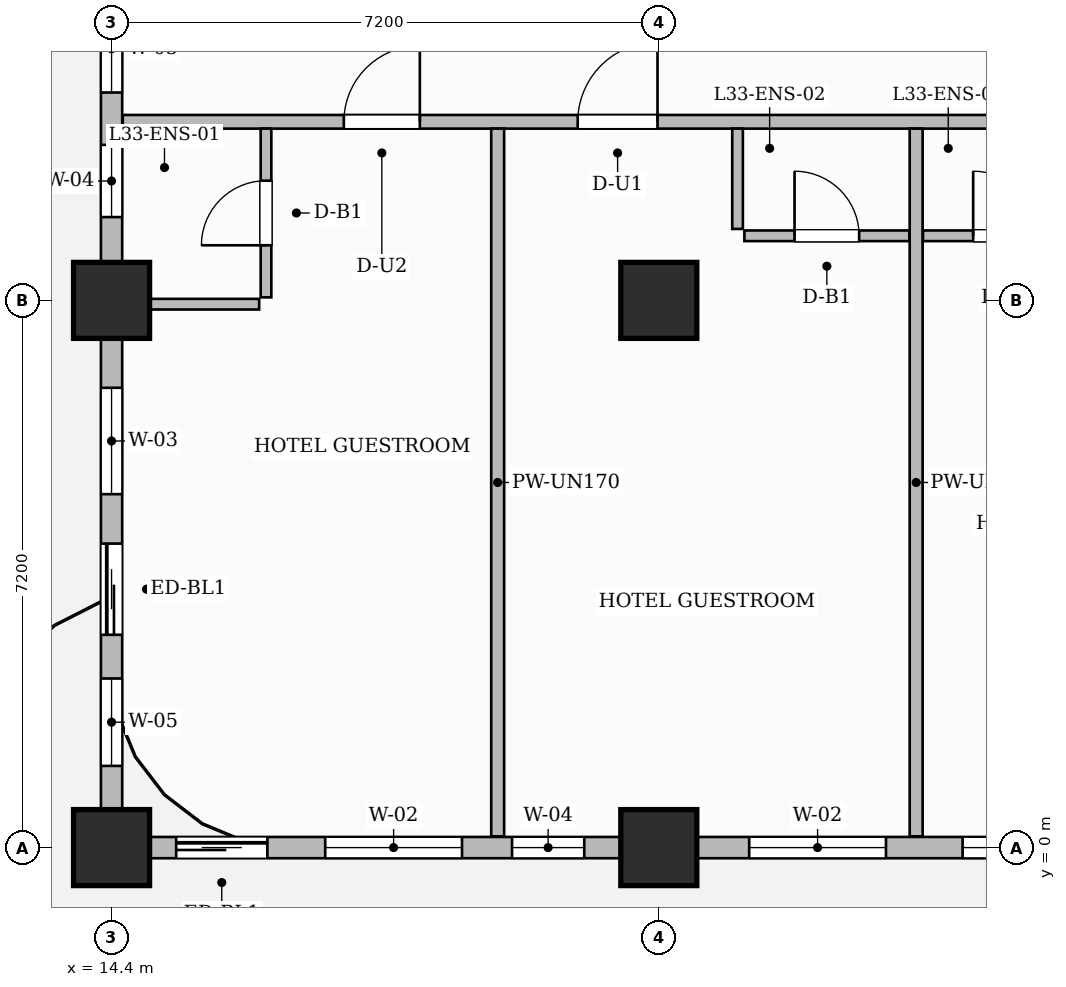
"""IFC4 building model, lengths in metres.
Left out: names, types, materials, properties, quantities, classifications, styles, units other than length and angle.
Written with IfcOpenShell. Run it as: python <this file> out.ifc"""

import sys

from ifc_helpers import new_model, si_unit, direction, frame, frame_2d, origin, origin_2d, place, context, subcontext, project, spatial, rectangle, extrude, source, transform, mapped, element, fill, save


model = new_model("IFC4")
c1 = context("Model", 3, precision=1e-05, world=origin(), true_north=direction((0.0, 1.0)))
c2 = subcontext(c1, "Body", "Model", "MODEL_VIEW")
j1 = project(units=[si_unit("LENGTHUNIT", "METRE"), si_unit("PLANEANGLEUNIT", "RADIAN")], contexts=[c1])
p1 = place(None, origin())
s1 = spatial("IfcSite", under=j1, at=p1, CompositionType="ELEMENT")
p2 = place(p1, origin())
s2 = spatial("IfcBuilding", under=s1, at=p2, CompositionType="ELEMENT")
p3 = place(p2, frame((0.0, 0.0, 134.0)))
s3 = spatial("IfcBuildingStorey", under=s2, at=p3, CompositionType="ELEMENT", Elevation=134.0)
m1 = source(origin(), c2, "Body", "SweptSolid", [
    extrude(rectangle(XDim=1.0, YDim=1.0, at=origin_2d()), origin(), (0.0, 0.0, 1.0), 3.7),
])
for number, where, z_axis, x_axis in (
    (1, (14.4, 0.0, 0.0), (0.0, 0.0, 1.0), (1.0, 0.0, 0.0)),
    (2, (14.4, 7.2, 0.0), (0.0, 0.0, 1.0), (1.0, 0.0, 0.0)),
    (3, (21.6, 0.0, 0.0), (0.0, 0.0, 1.0), (1.0, 0.0, 0.0)),
    (4, (21.6, 7.2, 0.0), (0.0, 0.0, 1.0), (1.0, 0.0, 0.0)),
):
    element("IfcColumn", number, at=place(p3, frame(where, z_axis=z_axis, x_axis=x_axis)), inside=s3, PredefinedType="COLUMN", context=c2, shape_type="MappedRepresentation", body=[
        mapped(m1, transform((0.0, 0.0, 0.0), scale=1.0)),
    ])
p4 = place(p3, frame((14.548, 9.55, 0.0), z_axis=(0.0, 0.0, 1.0), x_axis=(1.0, 0.0, 0.0)))
e5 = element("IfcWall", 5, at=p4, inside=s3, PredefinedType="PARTITIONING", context=c2, shape_type="SweptSolid", body=[
    extrude(rectangle(XDim=15.562, YDim=0.18, at=frame_2d((7.781, 0.0))), origin(), (0.0, 0.0, 1.0), 3.45),
])
p5 = place(p4, frame((2.908, 0.0, 0.0)))
e6 = element("IfcOpeningElement", 6, at=p5, cuts=e5, PredefinedType="OPENING", context=c2, shape_type="SweptSolid", body=[
    extrude(rectangle(XDim=1.0, YDim=2.2, at=frame_2d((0.5, 1.1))), frame((0.0, 0.1, 0.0), z_axis=(0.0, -1.0, 0.0), x_axis=(1.0, 0.0, 0.0)), (0.0, 0.0, 1.0), 0.2),
])
p6 = place(p4, frame((5.985, 0.0, 0.0)))
e7 = element("IfcOpeningElement", 7, at=p6, cuts=e5, PredefinedType="OPENING", context=c2, shape_type="SweptSolid", body=[
    extrude(rectangle(XDim=1.05, YDim=2.25, at=frame_2d((0.525, 1.125))), frame((0.0, 0.1, 0.0), z_axis=(0.0, -1.0, 0.0), x_axis=(1.0, 0.0, 0.0)), (0.0, 0.0, 1.0), 0.2),
])
p7 = place(p4, frame((13.72, 0.0, 0.0)))
e8 = element("IfcOpeningElement", 8, at=p7, cuts=e5, PredefinedType="OPENING", context=c2, shape_type="SweptSolid", body=[
    extrude(rectangle(XDim=1.0, YDim=2.2, at=frame_2d((0.5, 1.1))), frame((0.0, 0.1, 0.0), z_axis=(0.0, -1.0, 0.0), x_axis=(1.0, 0.0, 0.0)), (0.0, 0.0, 1.0), 0.2),
])
p8 = place(p3, frame((19.48, 0.148, 0.0), z_axis=(0.0, 0.0, 1.0), x_axis=(0.0, 1.0, 0.0)))
e9 = element("IfcWall", 9, at=p8, inside=s3, PredefinedType="PARTITIONING", context=c2, shape_type="SweptSolid", body=[
    extrude(rectangle(XDim=9.312, YDim=0.17, at=frame_2d((4.656, 0.0))), origin(), (0.0, 0.0, 1.0), 3.45),
])
p9 = place(p3, frame((24.986, 0.148, 0.0), z_axis=(0.0, 0.0, 1.0), x_axis=(0.0, 1.0, 0.0)))
e10 = element("IfcWall", 10, at=p9, inside=s3, PredefinedType="PARTITIONING", context=c2, shape_type="SweptSolid", body=[
    extrude(rectangle(XDim=9.312, YDim=0.17, at=frame_2d((4.656, 0.0))), origin(), (0.0, 0.0, 1.0), 3.105),
])
p10 = place(p3, frame((16.432, 7.24, 0.0), z_axis=(0.0, 0.0, 1.0), x_axis=(0.0, 1.0, 0.0)))
e11 = element("IfcWall", 11, at=p10, inside=s3, PredefinedType="PARTITIONING", context=c2, shape_type="SweptSolid", body=[
    extrude(rectangle(XDim=2.22, YDim=0.14, at=frame_2d((1.11, 0.0))), origin(), (0.0, 0.0, 1.0), 3.45),
])
p11 = place(p10, frame((0.685, 0.0, 0.0)))
e12 = element("IfcOpeningElement", 12, at=p11, cuts=e11, PredefinedType="OPENING", context=c2, shape_type="SweptSolid", body=[
    extrude(rectangle(XDim=0.85, YDim=2.1, at=frame_2d((0.425, 1.05))), frame((0.0, 0.08, 0.0), z_axis=(0.0, -1.0, 0.0), x_axis=(1.0, 0.0, 0.0)), (0.0, 0.0, 1.0), 0.16),
])
p12 = place(p3, frame((14.49, 7.15, 0.0), z_axis=(0.0, 0.0, 1.0), x_axis=(1.0, 0.0, 0.0)))
e13 = element("IfcWall", 13, at=p12, inside=s3, PredefinedType="PARTITIONING", context=c2, shape_type="SweptSolid", body=[
    extrude(rectangle(XDim=1.852, YDim=0.14, at=frame_2d((0.926, 0.0))), origin(), (0.0, 0.0, 1.0), 2.935),
])
p13 = place(p3, frame((22.636, 8.14, 0.0), z_axis=(0.0, 0.0, 1.0), x_axis=(0.0, 1.0, 0.0)))
e14 = element("IfcWall", 14, at=p13, inside=s3, PredefinedType="PARTITIONING", context=c2, shape_type="SweptSolid", body=[
    extrude(rectangle(XDim=1.32, YDim=0.14, at=frame_2d((0.66, 0.0))), origin(), (0.0, 0.0, 1.0), 3.45),
])
p14 = place(p3, frame((22.726, 8.05, 0.0), z_axis=(0.0, 0.0, 1.0), x_axis=(1.0, 0.0, 0.0)))
e15 = element("IfcWall", 15, at=p14, inside=s3, PredefinedType="PARTITIONING", context=c2, shape_type="SweptSolid", body=[
    extrude(rectangle(XDim=2.17, YDim=0.14, at=frame_2d((1.085, 0.0))), origin(), (0.0, 0.0, 1.0), 3.45),
])
p15 = place(p14, frame((0.66, 0.0, 0.0)))
e16 = element("IfcOpeningElement", 16, at=p15, cuts=e15, PredefinedType="OPENING", context=c2, shape_type="SweptSolid", body=[
    extrude(rectangle(XDim=0.85, YDim=2.1, at=frame_2d((0.425, 1.05))), frame((0.0, 0.08, 0.0), z_axis=(0.0, -1.0, 0.0), x_axis=(1.0, 0.0, 0.0)), (0.0, 0.0, 1.0), 0.16),
])
p16 = place(p3, frame((25.076, 8.05, 0.0), z_axis=(0.0, 0.0, 1.0), x_axis=(1.0, 0.0, 0.0)))
e17 = element("IfcWall", 17, at=p16, inside=s3, PredefinedType="PARTITIONING", context=c2, shape_type="SweptSolid", body=[
    extrude(rectangle(XDim=2.17, YDim=0.14, at=frame_2d((1.085, 0.0))), origin(), (0.0, 0.0, 1.0), 3.45),
])
p17 = place(p16, frame((0.66, 0.0, 0.0)))
e18 = element("IfcOpeningElement", 18, at=p17, cuts=e17, PredefinedType="OPENING", context=c2, shape_type="SweptSolid", body=[
    extrude(rectangle(XDim=0.85, YDim=2.1, at=frame_2d((0.425, 1.05))), frame((0.0, 0.08, 0.0), z_axis=(0.0, -1.0, 0.0), x_axis=(1.0, 0.0, 0.0)), (0.0, 0.0, 1.0), 0.16),
])
p18 = place(p3, frame((14.4, 0.0, 0.0), z_axis=(0.0, 0.0, 1.0), x_axis=(1.0, 0.0, 0.0)))
e19 = element("IfcWall", 19, at=p18, inside=s3, PredefinedType="SOLIDWALL", context=c2, shape_type="SweptSolid", body=[
    extrude(rectangle(XDim=35.4, YDim=0.28, at=frame_2d((17.7, 0.0))), origin(), (0.0, 0.0, 1.0), 2.935),
])
p19 = place(p18, frame((0.85, 0.0, 0.0)))
e20 = element("IfcOpeningElement", 20, at=p19, cuts=e19, PredefinedType="OPENING", context=c2, shape_type="SweptSolid", body=[
    extrude(rectangle(XDim=1.2, YDim=2.2, at=frame_2d((0.6, 1.1))), frame((0.0, 0.15, 0.0), z_axis=(0.0, -1.0, 0.0), x_axis=(1.0, 0.0, 0.0)), (0.0, 0.0, 1.0), 0.3),
])
p20 = place(p18, frame((2.811, 0.0, 0.8)))
e21 = element("IfcOpeningElement", 21, at=p20, cuts=e19, PredefinedType="OPENING", context=c2, shape_type="SweptSolid", body=[
    extrude(rectangle(XDim=1.8, YDim=1.85, at=frame_2d((0.9, 0.925))), frame((0.0, 0.15, 0.0), z_axis=(0.0, -1.0, 0.0), x_axis=(1.0, 0.0, 0.0)), (0.0, 0.0, 1.0), 0.3),
])
p21 = place(p18, frame((5.269, 0.0, 0.8)))
e22 = element("IfcOpeningElement", 22, at=p21, cuts=e19, PredefinedType="OPENING", context=c2, shape_type="SweptSolid", body=[
    extrude(rectangle(XDim=0.95, YDim=1.75, at=frame_2d((0.475, 0.875))), frame((0.0, 0.15, 0.0), z_axis=(0.0, -1.0, 0.0), x_axis=(1.0, 0.0, 0.0)), (0.0, 0.0, 1.0), 0.3),
])
p22 = place(p18, frame((8.389, 0.0, 0.8)))
e23 = element("IfcOpeningElement", 23, at=p22, cuts=e19, PredefinedType="OPENING", context=c2, shape_type="SweptSolid", body=[
    extrude(rectangle(XDim=1.8, YDim=1.85, at=frame_2d((0.9, 0.925))), frame((0.0, 0.15, 0.0), z_axis=(0.0, -1.0, 0.0), x_axis=(1.0, 0.0, 0.0)), (0.0, 0.0, 1.0), 0.3),
])
p23 = place(p18, frame((11.197, 0.0, 0.8)))
e24 = element("IfcOpeningElement", 24, at=p23, cuts=e19, PredefinedType="OPENING", context=c2, shape_type="SweptSolid", body=[
    extrude(rectangle(XDim=1.8, YDim=1.85, at=frame_2d((0.9, 0.925))), frame((0.0, 0.15, 0.0), z_axis=(0.0, -1.0, 0.0), x_axis=(1.0, 0.0, 0.0)), (0.0, 0.0, 1.0), 0.3),
])
p24 = place(p18, frame((16.804, 0.0, 0.8)))
e25 = element("IfcOpeningElement", 25, at=p24, cuts=e19, PredefinedType="OPENING", context=c2, shape_type="SweptSolid", body=[
    extrude(rectangle(XDim=1.8, YDim=1.85, at=frame_2d((0.9, 0.925))), frame((0.0, 0.15, 0.0), z_axis=(0.0, -1.0, 0.0), x_axis=(1.0, 0.0, 0.0)), (0.0, 0.0, 1.0), 0.3),
])
p25 = place(p18, frame((22.396, 0.0, 0.8)))
e26 = element("IfcOpeningElement", 26, at=p25, cuts=e19, PredefinedType="OPENING", context=c2, shape_type="SweptSolid", body=[
    extrude(rectangle(XDim=1.8, YDim=1.85, at=frame_2d((0.9, 0.925))), frame((0.0, 0.15, 0.0), z_axis=(0.0, -1.0, 0.0), x_axis=(1.0, 0.0, 0.0)), (0.0, 0.0, 1.0), 0.3),
])
p26 = place(p18, frame((25.629, 0.0, 0.8)))
e27 = element("IfcOpeningElement", 27, at=p26, cuts=e19, PredefinedType="OPENING", context=c2, shape_type="SweptSolid", body=[
    extrude(rectangle(XDim=0.95, YDim=1.75, at=frame_2d((0.475, 0.875))), frame((0.0, 0.15, 0.0), z_axis=(0.0, -1.0, 0.0), x_axis=(1.0, 0.0, 0.0)), (0.0, 0.0, 1.0), 0.3),
])
p27 = place(p18, frame((29.075, 0.0, 0.8)))
e28 = element("IfcOpeningElement", 28, at=p27, cuts=e19, PredefinedType="OPENING", context=c2, shape_type="SweptSolid", body=[
    extrude(rectangle(XDim=1.8, YDim=1.85, at=frame_2d((0.9, 0.925))), frame((0.0, 0.15, 0.0), z_axis=(0.0, -1.0, 0.0), x_axis=(1.0, 0.0, 0.0)), (0.0, 0.0, 1.0), 0.3),
])
p28 = place(p18, frame((32.125, 0.0, 0.8)))
e29 = element("IfcOpeningElement", 29, at=p28, cuts=e19, PredefinedType="OPENING", context=c2, shape_type="SweptSolid", body=[
    extrude(rectangle(XDim=1.8, YDim=1.85, at=frame_2d((0.9, 0.925))), frame((0.0, 0.15, 0.0), z_axis=(0.0, -1.0, 0.0), x_axis=(1.0, 0.0, 0.0)), (0.0, 0.0, 1.0), 0.3),
])
p29 = place(p3, frame((14.4, 0.05, 0.0), z_axis=(0.0, 0.0, 1.0), x_axis=(0.0, 1.0, 0.0)))
e30 = element("IfcWall", 30, at=p29, inside=s3, PredefinedType="SOLIDWALL", context=c2, shape_type="SweptSolid", body=[
    extrude(rectangle(XDim=20.6, YDim=0.28, at=frame_2d((10.3, 0.0))), origin(), (0.0, 0.0, 1.0), 2.935),
])
p30 = place(p29, frame((2.75, 0.0, 0.0)))
e31 = element("IfcOpeningElement", 31, at=p30, cuts=e30, PredefinedType="OPENING", context=c2, shape_type="SweptSolid", body=[
    extrude(rectangle(XDim=1.2, YDim=2.2, at=frame_2d((0.6, 1.1))), frame((0.0, 0.15, 0.0), z_axis=(0.0, -1.0, 0.0), x_axis=(1.0, 0.0, 0.0)), (0.0, 0.0, 1.0), 0.3),
])
p31 = place(p29, frame((1.025, 0.0, 0.8)))
e32 = element("IfcOpeningElement", 32, at=p31, cuts=e30, PredefinedType="OPENING", context=c2, shape_type="SweptSolid", body=[
    extrude(rectangle(XDim=1.15, YDim=1.8, at=frame_2d((0.575, 0.9))), frame((0.0, 0.15, 0.0), z_axis=(0.0, -1.0, 0.0), x_axis=(1.0, 0.0, 0.0)), (0.0, 0.0, 1.0), 0.3),
])
p32 = place(p29, frame((4.6, 0.0, 0.8)))
e33 = element("IfcOpeningElement", 33, at=p32, cuts=e30, PredefinedType="OPENING", context=c2, shape_type="SweptSolid", body=[
    extrude(rectangle(XDim=1.4, YDim=1.85, at=frame_2d((0.7, 0.925))), frame((0.0, 0.15, 0.0), z_axis=(0.0, -1.0, 0.0), x_axis=(1.0, 0.0, 0.0)), (0.0, 0.0, 1.0), 0.3),
])
p33 = place(p29, frame((8.246, 0.0, 0.8)))
e34 = element("IfcOpeningElement", 34, at=p33, cuts=e30, PredefinedType="OPENING", context=c2, shape_type="SweptSolid", body=[
    extrude(rectangle(XDim=0.95, YDim=1.75, at=frame_2d((0.475, 0.875))), frame((0.0, 0.15, 0.0), z_axis=(0.0, -1.0, 0.0), x_axis=(1.0, 0.0, 0.0)), (0.0, 0.0, 1.0), 0.3),
])
p34 = place(p29, frame((9.885, 0.0, 0.8)))
e35 = element("IfcOpeningElement", 35, at=p34, cuts=e30, PredefinedType="OPENING", context=c2, shape_type="SweptSolid", body=[
    extrude(rectangle(XDim=1.15, YDim=1.8, at=frame_2d((0.575, 0.9))), frame((0.0, 0.15, 0.0), z_axis=(0.0, -1.0, 0.0), x_axis=(1.0, 0.0, 0.0)), (0.0, 0.0, 1.0), 0.3),
])
p35 = place(p29, frame((11.789, 0.0, 0.8)))
e36 = element("IfcOpeningElement", 36, at=p35, cuts=e30, PredefinedType="OPENING", context=c2, shape_type="SweptSolid", body=[
    extrude(rectangle(XDim=1.4, YDim=1.85, at=frame_2d((0.7, 0.925))), frame((0.0, 0.15, 0.0), z_axis=(0.0, -1.0, 0.0), x_axis=(1.0, 0.0, 0.0)), (0.0, 0.0, 1.0), 0.3),
])
p36 = place(p29, frame((16.79, 0.0, 0.8)))
e37 = element("IfcOpeningElement", 37, at=p36, cuts=e30, PredefinedType="OPENING", context=c2, shape_type="SweptSolid", body=[
    extrude(rectangle(XDim=1.8, YDim=1.85, at=frame_2d((0.9, 0.925))), frame((0.0, 0.15, 0.0), z_axis=(0.0, -1.0, 0.0), x_axis=(1.0, 0.0, 0.0)), (0.0, 0.0, 1.0), 0.3),
])
m2 = source(origin(), c2, "Body", "SweptSolid", [
    extrude(rectangle(XDim=0.85, YDim=2.1, at=frame_2d((0.425, 1.05))), frame((0.0, 0.025, 0.0), z_axis=(0.0, -1.0, 0.0), x_axis=(1.0, 0.0, 0.0)), (0.0, 0.0, 1.0), 0.05),
])
p37 = place(p11, origin())
e38 = element("IfcDoor", 38, at=p37, inside=s3, OperationType="SINGLE_SWING_LEFT", PredefinedType="DOOR", context=c2, shape_type="MappedRepresentation", body=[
    mapped(m2, transform((0.0, 0.0, 0.0), scale=1.0)),
])
fill(e12, e38)
m3 = source(origin(), c2, "Body", "SweptSolid", [
    extrude(rectangle(XDim=1.0, YDim=2.2, at=frame_2d((0.5, 1.1))), frame((0.0, 0.025, 0.0), z_axis=(0.0, -1.0, 0.0), x_axis=(1.0, 0.0, 0.0)), (0.0, 0.0, 1.0), 0.05),
])
p38 = place(p5, origin())
e39 = element("IfcDoor", 39, at=p38, inside=s3, OperationType="SINGLE_SWING_RIGHT", PredefinedType="DOOR", context=c2, shape_type="MappedRepresentation", body=[
    mapped(m3, transform((0.0, 0.0, 0.0), scale=1.0)),
])
fill(e6, e39)
p39 = place(p15, origin())
e40 = element("IfcDoor", 40, at=p39, inside=s3, OperationType="SINGLE_SWING_LEFT", PredefinedType="DOOR", context=c2, shape_type="MappedRepresentation", body=[
    mapped(m2, transform((0.0, 0.0, 0.0), scale=1.0)),
])
fill(e16, e40)
m4 = source(origin(), c2, "Body", "SweptSolid", [
    extrude(rectangle(XDim=1.05, YDim=2.25, at=frame_2d((0.525, 1.125))), frame((0.0, 0.025, 0.0), z_axis=(0.0, -1.0, 0.0), x_axis=(1.0, 0.0, 0.0)), (0.0, 0.0, 1.0), 0.05),
])
p40 = place(p6, origin())
e41 = element("IfcDoor", 41, at=p40, inside=s3, OperationType="SINGLE_SWING_RIGHT", PredefinedType="DOOR", context=c2, shape_type="MappedRepresentation", body=[
    mapped(m4, transform((0.0, 0.0, 0.0), scale=1.0)),
])
fill(e7, e41)
p41 = place(p17, origin())
e42 = element("IfcDoor", 42, at=p41, inside=s3, OperationType="SINGLE_SWING_LEFT", PredefinedType="DOOR", context=c2, shape_type="MappedRepresentation", body=[
    mapped(m2, transform((0.0, 0.0, 0.0), scale=1.0)),
])
fill(e18, e42)
m5 = source(origin(), c2, "Body", "SweptSolid", [
    extrude(rectangle(XDim=1.2, YDim=2.2, at=frame_2d((0.6, 1.1))), frame((0.0, 0.025, 0.0), z_axis=(0.0, -1.0, 0.0), x_axis=(1.0, 0.0, 0.0)), (0.0, 0.0, 1.0), 0.05),
])
p42 = place(p19, origin())
e43 = element("IfcDoor", 43, at=p42, inside=s3, OperationType="SLIDING_TO_LEFT", PredefinedType="DOOR", context=c2, shape_type="MappedRepresentation", body=[
    mapped(m5, transform((0.0, 0.0, 0.0), scale=1.0)),
])
fill(e20, e43)
p43 = place(p30, origin())
e44 = element("IfcDoor", 44, at=p43, inside=s3, OperationType="SLIDING_TO_LEFT", PredefinedType="DOOR", context=c2, shape_type="MappedRepresentation", body=[
    mapped(m5, transform((0.0, 0.0, 0.0), scale=1.0)),
])
fill(e31, e44)
m6 = source(origin(), c2, "Body", "SweptSolid", [
    extrude(rectangle(XDim=1.8, YDim=1.85, at=frame_2d((0.9, 0.925))), frame((0.0, 0.03, 0.0), z_axis=(0.0, -1.0, 0.0), x_axis=(1.0, 0.0, 0.0)), (0.0, 0.0, 1.0), 0.06),
])
p44 = place(p20, origin())
e45 = element("IfcWindow", 45, at=p44, inside=s3, PartitioningType="DOUBLE_PANEL_VERTICAL", PredefinedType="WINDOW", context=c2, shape_type="MappedRepresentation", body=[
    mapped(m6, transform((0.0, 0.0, 0.0), scale=1.0)),
])
fill(e21, e45)
m7 = source(origin(), c2, "Body", "SweptSolid", [
    extrude(rectangle(XDim=0.95, YDim=1.75, at=frame_2d((0.475, 0.875))), frame((0.0, 0.03, 0.0), z_axis=(0.0, -1.0, 0.0), x_axis=(1.0, 0.0, 0.0)), (0.0, 0.0, 1.0), 0.06),
])
p45 = place(p21, origin())
e46 = element("IfcWindow", 46, at=p45, inside=s3, PartitioningType="SINGLE_PANEL", PredefinedType="WINDOW", context=c2, shape_type="MappedRepresentation", body=[
    mapped(m7, transform((0.0, 0.0, 0.0), scale=1.0)),
])
fill(e22, e46)
p46 = place(p22, origin())
e47 = element("IfcWindow", 47, at=p46, inside=s3, PartitioningType="DOUBLE_PANEL_VERTICAL", PredefinedType="WINDOW", context=c2, shape_type="MappedRepresentation", body=[
    mapped(m6, transform((0.0, 0.0, 0.0), scale=1.0)),
])
fill(e23, e47)
p47 = place(p23, origin())
e48 = element("IfcWindow", 48, at=p47, inside=s3, PartitioningType="DOUBLE_PANEL_VERTICAL", PredefinedType="WINDOW", context=c2, shape_type="MappedRepresentation", body=[
    mapped(m6, transform((0.0, 0.0, 0.0), scale=1.0)),
])
fill(e24, e48)
m8 = source(origin(), c2, "Body", "SweptSolid", [
    extrude(rectangle(XDim=1.15, YDim=1.8, at=frame_2d((0.575, 0.9))), frame((0.0, 0.03, 0.0), z_axis=(0.0, -1.0, 0.0), x_axis=(1.0, 0.0, 0.0)), (0.0, 0.0, 1.0), 0.06),
])
p48 = place(p31, origin())
e49 = element("IfcWindow", 49, at=p48, inside=s3, PartitioningType="SINGLE_PANEL", PredefinedType="WINDOW", context=c2, shape_type="MappedRepresentation", body=[
    mapped(m8, transform((0.0, 0.0, 0.0), scale=1.0)),
])
fill(e32, e49)
m9 = source(origin(), c2, "Body", "SweptSolid", [
    extrude(rectangle(XDim=1.4, YDim=1.85, at=frame_2d((0.7, 0.925))), frame((0.0, 0.03, 0.0), z_axis=(0.0, -1.0, 0.0), x_axis=(1.0, 0.0, 0.0)), (0.0, 0.0, 1.0), 0.06),
])
p49 = place(p32, origin())
e50 = element("IfcWindow", 50, at=p49, inside=s3, PartitioningType="SINGLE_PANEL", PredefinedType="WINDOW", context=c2, shape_type="MappedRepresentation", body=[
    mapped(m9, transform((0.0, 0.0, 0.0), scale=1.0)),
])
fill(e33, e50)
p50 = place(p33, origin())
e51 = element("IfcWindow", 51, at=p50, inside=s3, PartitioningType="SINGLE_PANEL", PredefinedType="WINDOW", context=c2, shape_type="MappedRepresentation", body=[
    mapped(m7, transform((0.0, 0.0, 0.0), scale=1.0)),
])
fill(e34, e51)
p51 = place(p34, origin())
e52 = element("IfcWindow", 52, at=p51, inside=s3, PartitioningType="SINGLE_PANEL", PredefinedType="WINDOW", context=c2, shape_type="MappedRepresentation", body=[
    mapped(m8, transform((0.0, 0.0, 0.0), scale=1.0)),
])
fill(e35, e52)
save(model, sys.argv[1])
